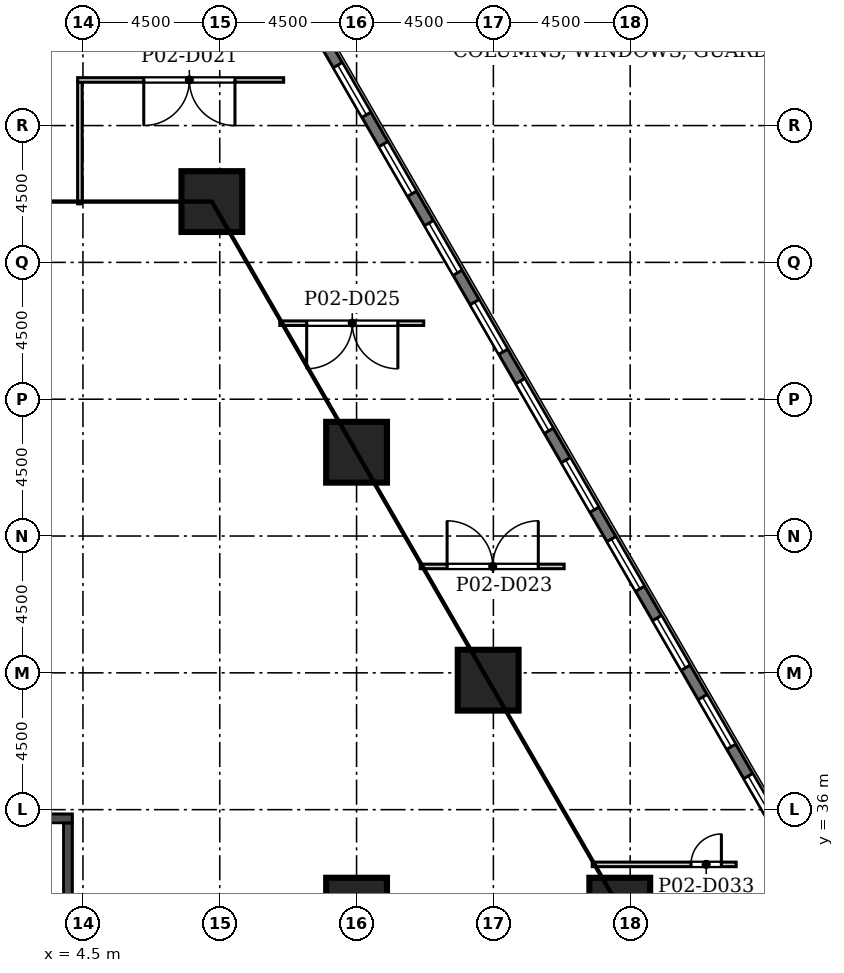
"""IFC4 building model, lengths in metres.
Left out: names, types, materials, properties, quantities, classifications, styles, units other than length and angle.
Written with IfcOpenShell. Run it as: python <this file> out.ifc"""

import sys

from ifc_helpers import new_model, si_unit, direction, frame, frame_2d, origin, origin_2d, place, context, subcontext, project, spatial, rectangle, extrude, element, fill, save


model = new_model("IFC4")
c1 = context("Model", 3, precision=1e-05, world=origin(), true_north=direction((0.0, 1.0)))
c2 = subcontext(c1, "Body", "Model", "MODEL_VIEW")
j1 = project(units=[si_unit("LENGTHUNIT", "METRE"), si_unit("PLANEANGLEUNIT", "RADIAN")], contexts=[c1])
p1 = place(None, origin())
s1 = spatial("IfcSite", under=j1, at=p1, CompositionType="ELEMENT")
p2 = place(p1, origin())
s2 = spatial("IfcBuilding", under=s1, at=p2, CompositionType="ELEMENT")
p3 = place(p2, frame((0.0, 0.0, 14.0)))
s3 = spatial("IfcBuildingStorey", under=s2, at=p3, CompositionType="ELEMENT", Elevation=14.0)
for number, where, z_axis, x_axis in (
    (1, (8.74, 56.0, 0.0), (0.0, 0.0, 1.0), (1.0, 0.0, 0.0)),
    (2, (22.158, 32.76, 0.0), (0.0, 0.0, 1.0), (1.0, 0.0, 0.0)),
    (3, (13.5, 47.756, 0.0), (0.0, 0.0, 1.0), (1.0, 0.0, 0.0)),
    (4, (13.5, 32.76, 0.0), (0.0, 0.0, 1.0), (1.0, 0.0, 0.0)),
    (5, (17.829, 40.258, 0.0), (0.0, 0.0, 1.0), (1.0, 0.0, 0.0)),
):
    element("IfcColumn", number, at=place(p3, frame(where, z_axis=z_axis, x_axis=x_axis)), inside=s3, PredefinedType="COLUMN", context=c2, shape_type="SweptSolid", body=[
        extrude(rectangle(XDim=2.0, YDim=2.0, at=origin_2d()), origin(), (0.0, 0.0, 1.0), 6.0),
    ])
p4 = place(p3, frame((42.853, 8.575, 0.0), z_axis=(0.0, 0.0, 1.0), x_axis=(-0.49999894854, 0.866026010844, 0.0)))
e6 = element("IfcWall", 6, at=p4, inside=s3, PredefinedType="SOLIDWALL", context=c2, shape_type="SweptSolid", body=[
    extrude(rectangle(XDim=76.0, YDim=0.34, at=frame_2d((38.0, 0.0))), origin(), (0.0, 0.0, 1.0), 5.7),
])
p5 = place(p4, frame((1.058, 0.0, 0.9)))
e7 = element("IfcOpeningElement", 7, at=p5, cuts=e6, PredefinedType="OPENING", context=c2, shape_type="SweptSolid", body=[
    extrude(rectangle(XDim=1.885, YDim=3.5, at=frame_2d((0.942, 1.75))), frame((0.0, 0.18, 0.0), z_axis=(0.0, -1.0, 0.0), x_axis=(1.0, 0.0, 0.0)), (0.0, 0.0, 1.0), 0.36),
])
p6 = place(p4, frame((4.058, 0.0, 0.9)))
e8 = element("IfcOpeningElement", 8, at=p6, cuts=e6, PredefinedType="OPENING", context=c2, shape_type="SweptSolid", body=[
    extrude(rectangle(XDim=1.885, YDim=3.5, at=frame_2d((0.942, 1.75))), frame((0.0, 0.18, 0.0), z_axis=(0.0, -1.0, 0.0), x_axis=(1.0, 0.0, 0.0)), (0.0, 0.0, 1.0), 0.36),
])
p7 = place(p4, frame((7.058, 0.0, 0.9)))
e9 = element("IfcOpeningElement", 9, at=p7, cuts=e6, PredefinedType="OPENING", context=c2, shape_type="SweptSolid", body=[
    extrude(rectangle(XDim=1.885, YDim=3.5, at=frame_2d((0.942, 1.75))), frame((0.0, 0.18, 0.0), z_axis=(0.0, -1.0, 0.0), x_axis=(1.0, 0.0, 0.0)), (0.0, 0.0, 1.0), 0.36),
])
p8 = place(p4, frame((10.058, 0.0, 0.9)))
e10 = element("IfcOpeningElement", 10, at=p8, cuts=e6, PredefinedType="OPENING", context=c2, shape_type="SweptSolid", body=[
    extrude(rectangle(XDim=1.885, YDim=3.5, at=frame_2d((0.942, 1.75))), frame((0.0, 0.18, 0.0), z_axis=(0.0, -1.0, 0.0), x_axis=(1.0, 0.0, 0.0)), (0.0, 0.0, 1.0), 0.36),
])
p9 = place(p4, frame((13.058, 0.0, 0.9)))
e11 = element("IfcOpeningElement", 11, at=p9, cuts=e6, PredefinedType="OPENING", context=c2, shape_type="SweptSolid", body=[
    extrude(rectangle(XDim=1.885, YDim=3.5, at=frame_2d((0.942, 1.75))), frame((0.0, 0.18, 0.0), z_axis=(0.0, -1.0, 0.0), x_axis=(1.0, 0.0, 0.0)), (0.0, 0.0, 1.0), 0.36),
])
p10 = place(p4, frame((16.058, 0.0, 0.9)))
e12 = element("IfcOpeningElement", 12, at=p10, cuts=e6, PredefinedType="OPENING", context=c2, shape_type="SweptSolid", body=[
    extrude(rectangle(XDim=1.885, YDim=3.5, at=frame_2d((0.942, 1.75))), frame((0.0, 0.18, 0.0), z_axis=(0.0, -1.0, 0.0), x_axis=(1.0, 0.0, 0.0)), (0.0, 0.0, 1.0), 0.36),
])
p11 = place(p4, frame((19.058, 0.0, 0.9)))
e13 = element("IfcOpeningElement", 13, at=p11, cuts=e6, PredefinedType="OPENING", context=c2, shape_type="SweptSolid", body=[
    extrude(rectangle(XDim=1.885, YDim=3.5, at=frame_2d((0.942, 1.75))), frame((0.0, 0.18, 0.0), z_axis=(0.0, -1.0, 0.0), x_axis=(1.0, 0.0, 0.0)), (0.0, 0.0, 1.0), 0.36),
])
p12 = place(p4, frame((22.058, 0.0, 0.9)))
e14 = element("IfcOpeningElement", 14, at=p12, cuts=e6, PredefinedType="OPENING", context=c2, shape_type="SweptSolid", body=[
    extrude(rectangle(XDim=1.885, YDim=3.5, at=frame_2d((0.942, 1.75))), frame((0.0, 0.18, 0.0), z_axis=(0.0, -1.0, 0.0), x_axis=(1.0, 0.0, 0.0)), (0.0, 0.0, 1.0), 0.36),
])
p13 = place(p4, frame((25.058, 0.0, 0.9)))
e15 = element("IfcOpeningElement", 15, at=p13, cuts=e6, PredefinedType="OPENING", context=c2, shape_type="SweptSolid", body=[
    extrude(rectangle(XDim=1.885, YDim=3.5, at=frame_2d((0.942, 1.75))), frame((0.0, 0.18, 0.0), z_axis=(0.0, -1.0, 0.0), x_axis=(1.0, 0.0, 0.0)), (0.0, 0.0, 1.0), 0.36),
])
p14 = place(p4, frame((28.058, 0.0, 0.9)))
e16 = element("IfcOpeningElement", 16, at=p14, cuts=e6, PredefinedType="OPENING", context=c2, shape_type="SweptSolid", body=[
    extrude(rectangle(XDim=1.885, YDim=3.5, at=frame_2d((0.942, 1.75))), frame((0.0, 0.18, 0.0), z_axis=(0.0, -1.0, 0.0), x_axis=(1.0, 0.0, 0.0)), (0.0, 0.0, 1.0), 0.36),
])
p15 = place(p4, frame((31.058, 0.0, 0.9)))
e17 = element("IfcOpeningElement", 17, at=p15, cuts=e6, PredefinedType="OPENING", context=c2, shape_type="SweptSolid", body=[
    extrude(rectangle(XDim=1.885, YDim=3.5, at=frame_2d((0.942, 1.75))), frame((0.0, 0.18, 0.0), z_axis=(0.0, -1.0, 0.0), x_axis=(1.0, 0.0, 0.0)), (0.0, 0.0, 1.0), 0.36),
])
p16 = place(p4, frame((34.058, 0.0, 0.9)))
e18 = element("IfcOpeningElement", 18, at=p16, cuts=e6, PredefinedType="OPENING", context=c2, shape_type="SweptSolid", body=[
    extrude(rectangle(XDim=1.885, YDim=3.5, at=frame_2d((0.942, 1.75))), frame((0.0, 0.18, 0.0), z_axis=(0.0, -1.0, 0.0), x_axis=(1.0, 0.0, 0.0)), (0.0, 0.0, 1.0), 0.36),
])
p17 = place(p4, frame((37.058, 0.0, 0.9)))
e19 = element("IfcOpeningElement", 19, at=p17, cuts=e6, PredefinedType="OPENING", context=c2, shape_type="SweptSolid", body=[
    extrude(rectangle(XDim=1.885, YDim=3.5, at=frame_2d((0.942, 1.75))), frame((0.0, 0.18, 0.0), z_axis=(0.0, -1.0, 0.0), x_axis=(1.0, 0.0, 0.0)), (0.0, 0.0, 1.0), 0.36),
])
p18 = place(p4, frame((40.058, 0.0, 0.9)))
e20 = element("IfcOpeningElement", 20, at=p18, cuts=e6, PredefinedType="OPENING", context=c2, shape_type="SweptSolid", body=[
    extrude(rectangle(XDim=1.885, YDim=3.5, at=frame_2d((0.942, 1.75))), frame((0.0, 0.18, 0.0), z_axis=(0.0, -1.0, 0.0), x_axis=(1.0, 0.0, 0.0)), (0.0, 0.0, 1.0), 0.36),
])
p19 = place(p4, frame((43.058, 0.0, 0.9)))
e21 = element("IfcOpeningElement", 21, at=p19, cuts=e6, PredefinedType="OPENING", context=c2, shape_type="SweptSolid", body=[
    extrude(rectangle(XDim=1.885, YDim=3.5, at=frame_2d((0.942, 1.75))), frame((0.0, 0.18, 0.0), z_axis=(0.0, -1.0, 0.0), x_axis=(1.0, 0.0, 0.0)), (0.0, 0.0, 1.0), 0.36),
])
p20 = place(p4, frame((46.058, 0.0, 0.9)))
e22 = element("IfcOpeningElement", 22, at=p20, cuts=e6, PredefinedType="OPENING", context=c2, shape_type="SweptSolid", body=[
    extrude(rectangle(XDim=1.885, YDim=3.5, at=frame_2d((0.942, 1.75))), frame((0.0, 0.18, 0.0), z_axis=(0.0, -1.0, 0.0), x_axis=(1.0, 0.0, 0.0)), (0.0, 0.0, 1.0), 0.36),
])
p21 = place(p4, frame((49.058, 0.0, 0.9)))
e23 = element("IfcOpeningElement", 23, at=p21, cuts=e6, PredefinedType="OPENING", context=c2, shape_type="SweptSolid", body=[
    extrude(rectangle(XDim=1.885, YDim=3.5, at=frame_2d((0.942, 1.75))), frame((0.0, 0.18, 0.0), z_axis=(0.0, -1.0, 0.0), x_axis=(1.0, 0.0, 0.0)), (0.0, 0.0, 1.0), 0.36),
])
p22 = place(p4, frame((52.058, 0.0, 0.9)))
e24 = element("IfcOpeningElement", 24, at=p22, cuts=e6, PredefinedType="OPENING", context=c2, shape_type="SweptSolid", body=[
    extrude(rectangle(XDim=1.885, YDim=3.5, at=frame_2d((0.942, 1.75))), frame((0.0, 0.18, 0.0), z_axis=(0.0, -1.0, 0.0), x_axis=(1.0, 0.0, 0.0)), (0.0, 0.0, 1.0), 0.36),
])
p23 = place(p4, frame((55.058, 0.0, 0.9)))
e25 = element("IfcOpeningElement", 25, at=p23, cuts=e6, PredefinedType="OPENING", context=c2, shape_type="SweptSolid", body=[
    extrude(rectangle(XDim=1.885, YDim=3.5, at=frame_2d((0.942, 1.75))), frame((0.0, 0.18, 0.0), z_axis=(0.0, -1.0, 0.0), x_axis=(1.0, 0.0, 0.0)), (0.0, 0.0, 1.0), 0.36),
])
p24 = place(p4, frame((58.058, 0.0, 0.9)))
e26 = element("IfcOpeningElement", 26, at=p24, cuts=e6, PredefinedType="OPENING", context=c2, shape_type="SweptSolid", body=[
    extrude(rectangle(XDim=1.885, YDim=3.5, at=frame_2d((0.942, 1.75))), frame((0.0, 0.18, 0.0), z_axis=(0.0, -1.0, 0.0), x_axis=(1.0, 0.0, 0.0)), (0.0, 0.0, 1.0), 0.36),
])
p25 = place(p4, frame((61.058, 0.0, 0.9)))
e27 = element("IfcOpeningElement", 27, at=p25, cuts=e6, PredefinedType="OPENING", context=c2, shape_type="SweptSolid", body=[
    extrude(rectangle(XDim=1.885, YDim=3.5, at=frame_2d((0.942, 1.75))), frame((0.0, 0.18, 0.0), z_axis=(0.0, -1.0, 0.0), x_axis=(1.0, 0.0, 0.0)), (0.0, 0.0, 1.0), 0.36),
])
p26 = place(p4, frame((64.058, 0.0, 0.9)))
e28 = element("IfcOpeningElement", 28, at=p26, cuts=e6, PredefinedType="OPENING", context=c2, shape_type="SweptSolid", body=[
    extrude(rectangle(XDim=1.885, YDim=3.5, at=frame_2d((0.942, 1.75))), frame((0.0, 0.18, 0.0), z_axis=(0.0, -1.0, 0.0), x_axis=(1.0, 0.0, 0.0)), (0.0, 0.0, 1.0), 0.36),
])
p27 = place(p4, frame((67.058, 0.0, 0.9)))
e29 = element("IfcOpeningElement", 29, at=p27, cuts=e6, PredefinedType="OPENING", context=c2, shape_type="SweptSolid", body=[
    extrude(rectangle(XDim=1.885, YDim=3.5, at=frame_2d((0.942, 1.75))), frame((0.0, 0.18, 0.0), z_axis=(0.0, -1.0, 0.0), x_axis=(1.0, 0.0, 0.0)), (0.0, 0.0, 1.0), 0.36),
])
p28 = place(p4, frame((70.058, 0.0, 0.9)))
e30 = element("IfcOpeningElement", 30, at=p28, cuts=e6, PredefinedType="OPENING", context=c2, shape_type="SweptSolid", body=[
    extrude(rectangle(XDim=1.885, YDim=3.5, at=frame_2d((0.942, 1.75))), frame((0.0, 0.18, 0.0), z_axis=(0.0, -1.0, 0.0), x_axis=(1.0, 0.0, 0.0)), (0.0, 0.0, 1.0), 0.36),
])
p29 = place(p4, frame((73.058, 0.0, 0.9)))
e31 = element("IfcOpeningElement", 31, at=p29, cuts=e6, PredefinedType="OPENING", context=c2, shape_type="SweptSolid", body=[
    extrude(rectangle(XDim=1.885, YDim=3.5, at=frame_2d((0.942, 1.75))), frame((0.0, 0.18, 0.0), z_axis=(0.0, -1.0, 0.0), x_axis=(1.0, 0.0, 0.0)), (0.0, 0.0, 1.0), 0.36),
])
p30 = place(p3, frame((-4.15, 35.707, -0.3), z_axis=(0.0, 0.0, 1.0), x_axis=(1.0, 0.0, 0.0)))
e32 = element("IfcWall", 32, at=p30, inside=s3, PredefinedType="SOLIDWALL", context=c2, shape_type="SweptSolid", body=[
    extrude(rectangle(XDim=8.3, YDim=0.3, at=frame_2d((4.15, 0.0))), origin(), (0.0, 0.0, 1.0), 6.0),
])
p31 = place(p3, frame((4.0, 29.057, -0.3), z_axis=(0.0, 0.0, 1.0), x_axis=(0.0, 1.0, 0.0)))
e33 = element("IfcWall", 33, at=p31, inside=s3, PredefinedType="SOLIDWALL", context=c2, shape_type="SweptSolid", body=[
    extrude(rectangle(XDim=6.5, YDim=0.3, at=frame_2d((3.25, 0.0))), origin(), (0.0, 0.0, 1.0), 6.0),
])
p32 = place(p3, frame((21.251, 34.2, 0.0), z_axis=(0.0, 0.0, 1.0), x_axis=(1.0, 0.0, 0.0)))
e34 = element("IfcWall", 34, at=p32, inside=s3, PredefinedType="PARTITIONING", context=c2, shape_type="SweptSolid", body=[
    extrude(rectangle(XDim=4.734, YDim=0.15, at=frame_2d((2.367, 0.0))), origin(), (0.0, 0.0, 1.0), 5.7),
])
p33 = place(p32, frame((3.249, 0.0, 0.0)))
e35 = element("IfcOpeningElement", 35, at=p33, cuts=e34, PredefinedType="OPENING", context=c2, shape_type="SweptSolid", body=[
    extrude(rectangle(XDim=1.0, YDim=2.1, at=frame_2d((0.5, 1.05))), frame((0.0, 0.085, 0.0), z_axis=(0.0, -1.0, 0.0), x_axis=(1.0, 0.0, 0.0)), (0.0, 0.0, 1.0), 0.17),
])
p34 = place(p3, frame((15.594, 44.0, 0.0), z_axis=(0.0, 0.0, 1.0), x_axis=(1.0, 0.0, 0.0)))
e36 = element("IfcWall", 36, at=p34, inside=s3, PredefinedType="PARTITIONING", context=c2, shape_type="SweptSolid", body=[
    extrude(rectangle(XDim=4.734, YDim=0.15, at=frame_2d((2.367, 0.0))), origin(), (0.0, 0.0, 1.0), 5.7),
])
p35 = place(p34, frame((0.885, 0.0, 0.0)))
e37 = element("IfcOpeningElement", 37, at=p35, cuts=e36, PredefinedType="OPENING", context=c2, shape_type="SweptSolid", body=[
    extrude(rectangle(XDim=3.0, YDim=2.4, at=frame_2d((1.5, 1.2))), frame((0.0, 0.085, 0.0), z_axis=(0.0, -1.0, 0.0), x_axis=(1.0, 0.0, 0.0)), (0.0, 0.0, 1.0), 0.17),
])
p36 = place(p3, frame((10.975, 52.0, 0.0), z_axis=(0.0, 0.0, 1.0), x_axis=(1.0, 0.0, 0.0)))
e38 = element("IfcWall", 38, at=p36, inside=s3, PredefinedType="PARTITIONING", context=c2, shape_type="SweptSolid", body=[
    extrude(rectangle(XDim=4.734, YDim=0.15, at=frame_2d((2.367, 0.0))), origin(), (0.0, 0.0, 1.0), 5.7),
])
p37 = place(p36, frame((0.885, 0.0, 0.0)))
e39 = element("IfcOpeningElement", 39, at=p37, cuts=e38, PredefinedType="OPENING", context=c2, shape_type="SweptSolid", body=[
    extrude(rectangle(XDim=3.0, YDim=2.4, at=frame_2d((1.5, 1.2))), frame((0.0, 0.085, 0.0), z_axis=(0.0, -1.0, 0.0), x_axis=(1.0, 0.0, 0.0)), (0.0, 0.0, 1.0), 0.17),
])
p38 = place(p3, frame((4.4, 55.925, 0.0), z_axis=(0.0, 0.0, 1.0), x_axis=(0.0, 1.0, 0.0)))
e40 = element("IfcWall", 40, at=p38, inside=s3, PredefinedType="PARTITIONING", context=c2, shape_type="SweptSolid", body=[
    extrude(rectangle(XDim=4.0, YDim=0.15, at=frame_2d((2.0, 0.0))), origin(), (0.0, 0.0, 1.0), 5.7),
])
p39 = place(p3, frame((4.325, 60.0, 0.0), z_axis=(0.0, 0.0, 1.0), x_axis=(1.0, 0.0, 0.0)))
e41 = element("IfcWall", 41, at=p39, inside=s3, PredefinedType="PARTITIONING", context=c2, shape_type="SweptSolid", body=[
    extrude(rectangle(XDim=6.777, YDim=0.15, at=frame_2d((3.389, 0.0))), origin(), (0.0, 0.0, 1.0), 5.7),
])
p40 = place(p39, frame((2.175, 0.0, 0.0)))
e42 = element("IfcOpeningElement", 42, at=p40, cuts=e41, PredefinedType="OPENING", context=c2, shape_type="SweptSolid", body=[
    extrude(rectangle(XDim=3.0, YDim=2.4, at=frame_2d((1.5, 1.2))), frame((0.0, 0.085, 0.0), z_axis=(0.0, -1.0, 0.0), x_axis=(1.0, 0.0, 0.0)), (0.0, 0.0, 1.0), 0.17),
])
p41 = place(p15, origin())
e43 = element("IfcWindow", 43, at=p41, inside=s3, PartitioningType="SINGLE_PANEL", PredefinedType="WINDOW", context=c2, shape_type="SweptSolid", body=[
    extrude(rectangle(XDim=1.885, YDim=3.5, at=frame_2d((0.942, 1.75))), frame((0.0, 0.11, 0.0), z_axis=(0.0, -1.0, 0.0), x_axis=(1.0, 0.0, 0.0)), (0.0, 0.0, 1.0), 0.06),
])
fill(e17, e43)
p42 = place(p16, origin())
e44 = element("IfcWindow", 44, at=p42, inside=s3, PartitioningType="SINGLE_PANEL", PredefinedType="WINDOW", context=c2, shape_type="SweptSolid", body=[
    extrude(rectangle(XDim=1.885, YDim=3.5, at=frame_2d((0.942, 1.75))), frame((0.0, 0.11, 0.0), z_axis=(0.0, -1.0, 0.0), x_axis=(1.0, 0.0, 0.0)), (0.0, 0.0, 1.0), 0.06),
])
fill(e18, e44)
p43 = place(p17, origin())
e45 = element("IfcWindow", 45, at=p43, inside=s3, PartitioningType="SINGLE_PANEL", PredefinedType="WINDOW", context=c2, shape_type="SweptSolid", body=[
    extrude(rectangle(XDim=1.885, YDim=3.5, at=frame_2d((0.942, 1.75))), frame((0.0, 0.11, 0.0), z_axis=(0.0, -1.0, 0.0), x_axis=(1.0, 0.0, 0.0)), (0.0, 0.0, 1.0), 0.06),
])
fill(e19, e45)
p44 = place(p18, origin())
e46 = element("IfcWindow", 46, at=p44, inside=s3, PartitioningType="SINGLE_PANEL", PredefinedType="WINDOW", context=c2, shape_type="SweptSolid", body=[
    extrude(rectangle(XDim=1.885, YDim=3.5, at=frame_2d((0.942, 1.75))), frame((0.0, 0.11, 0.0), z_axis=(0.0, -1.0, 0.0), x_axis=(1.0, 0.0, 0.0)), (0.0, 0.0, 1.0), 0.06),
])
fill(e20, e46)
p45 = place(p19, origin())
e47 = element("IfcWindow", 47, at=p45, inside=s3, PartitioningType="SINGLE_PANEL", PredefinedType="WINDOW", context=c2, shape_type="SweptSolid", body=[
    extrude(rectangle(XDim=1.885, YDim=3.5, at=frame_2d((0.942, 1.75))), frame((0.0, 0.11, 0.0), z_axis=(0.0, -1.0, 0.0), x_axis=(1.0, 0.0, 0.0)), (0.0, 0.0, 1.0), 0.06),
])
fill(e21, e47)
p46 = place(p20, origin())
e48 = element("IfcWindow", 48, at=p46, inside=s3, PartitioningType="SINGLE_PANEL", PredefinedType="WINDOW", context=c2, shape_type="SweptSolid", body=[
    extrude(rectangle(XDim=1.885, YDim=3.5, at=frame_2d((0.942, 1.75))), frame((0.0, 0.11, 0.0), z_axis=(0.0, -1.0, 0.0), x_axis=(1.0, 0.0, 0.0)), (0.0, 0.0, 1.0), 0.06),
])
fill(e22, e48)
p47 = place(p21, origin())
e49 = element("IfcWindow", 49, at=p47, inside=s3, PartitioningType="SINGLE_PANEL", PredefinedType="WINDOW", context=c2, shape_type="SweptSolid", body=[
    extrude(rectangle(XDim=1.885, YDim=3.5, at=frame_2d((0.942, 1.75))), frame((0.0, 0.11, 0.0), z_axis=(0.0, -1.0, 0.0), x_axis=(1.0, 0.0, 0.0)), (0.0, 0.0, 1.0), 0.06),
])
fill(e23, e49)
p48 = place(p22, origin())
e50 = element("IfcWindow", 50, at=p48, inside=s3, PartitioningType="SINGLE_PANEL", PredefinedType="WINDOW", context=c2, shape_type="SweptSolid", body=[
    extrude(rectangle(XDim=1.885, YDim=3.5, at=frame_2d((0.942, 1.75))), frame((0.0, 0.11, 0.0), z_axis=(0.0, -1.0, 0.0), x_axis=(1.0, 0.0, 0.0)), (0.0, 0.0, 1.0), 0.06),
])
fill(e24, e50)
p49 = place(p23, origin())
e51 = element("IfcWindow", 51, at=p49, inside=s3, PartitioningType="SINGLE_PANEL", PredefinedType="WINDOW", context=c2, shape_type="SweptSolid", body=[
    extrude(rectangle(XDim=1.885, YDim=3.5, at=frame_2d((0.942, 1.75))), frame((0.0, 0.11, 0.0), z_axis=(0.0, -1.0, 0.0), x_axis=(1.0, 0.0, 0.0)), (0.0, 0.0, 1.0), 0.06),
])
fill(e25, e51)
p50 = place(p24, origin())
e52 = element("IfcWindow", 52, at=p50, inside=s3, PartitioningType="SINGLE_PANEL", PredefinedType="WINDOW", context=c2, shape_type="SweptSolid", body=[
    extrude(rectangle(XDim=1.885, YDim=3.5, at=frame_2d((0.942, 1.75))), frame((0.0, 0.11, 0.0), z_axis=(0.0, -1.0, 0.0), x_axis=(1.0, 0.0, 0.0)), (0.0, 0.0, 1.0), 0.06),
])
fill(e26, e52)
p51 = place(p40, frame((3.0, 0.0, 0.0), z_axis=(0.0, 0.0, 1.0), x_axis=(-1.0, 0.0, 0.0)))
e53 = element("IfcDoor", 53, at=p51, inside=s3, OperationType="DOUBLE_DOOR_SINGLE_SWING", PredefinedType="DOOR", context=c2, shape_type="SweptSolid", body=[
    extrude(rectangle(XDim=3.0, YDim=2.4, at=frame_2d((1.5, 1.2))), frame((0.0, 0.025, 0.0), z_axis=(0.0, -1.0, 0.0), x_axis=(1.0, 0.0, 0.0)), (0.0, 0.0, 1.0), 0.05),
])
fill(e42, e53)
p52 = place(p35, origin())
e54 = element("IfcDoor", 54, at=p52, inside=s3, OperationType="DOUBLE_DOOR_SINGLE_SWING", PredefinedType="DOOR", context=c2, shape_type="SweptSolid", body=[
    extrude(rectangle(XDim=3.0, YDim=2.4, at=frame_2d((1.5, 1.2))), frame((0.0, 0.025, 0.0), z_axis=(0.0, -1.0, 0.0), x_axis=(1.0, 0.0, 0.0)), (0.0, 0.0, 1.0), 0.05),
])
fill(e37, e54)
p53 = place(p37, frame((3.0, 0.0, 0.0), z_axis=(0.0, 0.0, 1.0), x_axis=(-1.0, 0.0, 0.0)))
e55 = element("IfcDoor", 55, at=p53, inside=s3, OperationType="DOUBLE_DOOR_SINGLE_SWING", PredefinedType="DOOR", context=c2, shape_type="SweptSolid", body=[
    extrude(rectangle(XDim=3.0, YDim=2.4, at=frame_2d((1.5, 1.2))), frame((0.0, 0.025, 0.0), z_axis=(0.0, -1.0, 0.0), x_axis=(1.0, 0.0, 0.0)), (0.0, 0.0, 1.0), 0.05),
])
fill(e39, e55)
p54 = place(p33, origin())
e56 = element("IfcDoor", 56, at=p54, inside=s3, OperationType="SINGLE_SWING_RIGHT", PredefinedType="DOOR", context=c2, shape_type="SweptSolid", body=[
    extrude(rectangle(XDim=1.0, YDim=2.1, at=frame_2d((0.5, 1.05))), frame((0.0, 0.025, 0.0), z_axis=(0.0, -1.0, 0.0), x_axis=(1.0, 0.0, 0.0)), (0.0, 0.0, 1.0), 0.05),
])
fill(e35, e56)
save(model, sys.argv[1])
